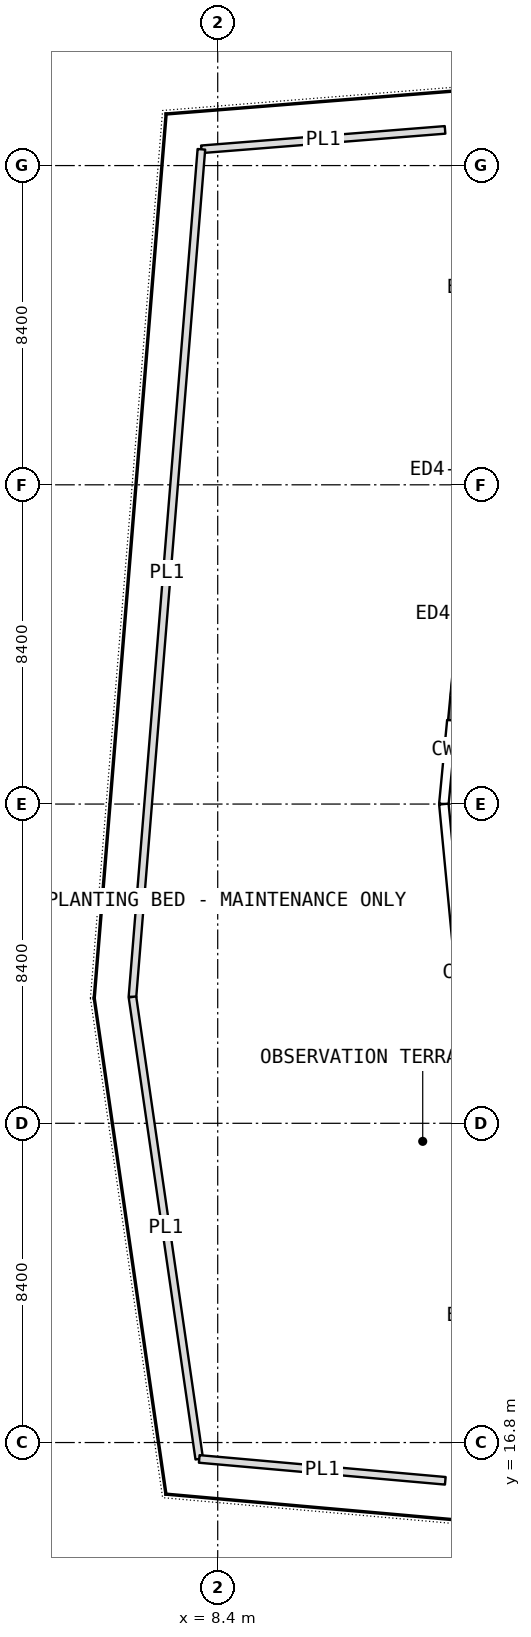
"""IFC4 building model, lengths in metres.
Left out: names, types, materials, properties, quantities, classifications, styles, units other than length and angle.
Written with IfcOpenShell. Run it as: python <this file> out.ifc"""

import sys

from ifc_helpers import new_model, si_unit, direction, frame, frame_2d, origin, place, context, subcontext, project, spatial, rectangle, extrude, element, save


model = new_model("IFC4")
c1 = context("Model", 3, precision=1e-05, world=origin(), true_north=direction((0.0, 1.0)))
c2 = subcontext(c1, "Body", "Model", "MODEL_VIEW")
j1 = project(units=[si_unit("LENGTHUNIT", "METRE"), si_unit("PLANEANGLEUNIT", "RADIAN")], contexts=[c1])
p1 = place(None, origin())
s1 = spatial("IfcSite", under=j1, at=p1, CompositionType="ELEMENT")
p2 = place(p1, origin())
s2 = spatial("IfcBuilding", under=s1, at=p2, CompositionType="ELEMENT")
p3 = place(p2, frame((0.0, 0.0, 291.35)))
s3 = spatial("IfcBuildingStorey", under=s2, at=p3, CompositionType="ELEMENT", Elevation=291.35)
p4 = place(p3, frame((14.791, 38.191, 0.0), z_axis=(0.0, 0.0, 1.0), x_axis=(-0.095313116599, -0.995447341553, 0.0)))
e1 = element("IfcWall", 1, at=p4, inside=s3, PredefinedType="SOLIDWALL", context=c2, shape_type="SweptSolid", body=[
    extrude(rectangle(XDim=2.4, YDim=0.2, at=frame_2d((1.2, 0.0))), origin(), (0.0, 0.0, 1.0), 5.1),
])
p5 = place(p4, frame((0.6, 0.0, 0.0)))
e2 = element("IfcOpeningElement", 2, at=p5, cuts=e1, PredefinedType="OPENING", context=c2, shape_type="SweptSolid", body=[
    extrude(rectangle(XDim=1.2, YDim=2.4, at=frame_2d((0.6, 1.2))), frame((0.0, 0.11, 0.0), z_axis=(0.0, -1.0, 0.0), x_axis=(1.0, 0.0, 0.0)), (0.0, 0.0, 1.0), 0.22),
])
p6 = place(p3, frame((14.382, 51.339, 0.0), z_axis=(0.0, 0.0, 1.0), x_axis=(-0.996836484012, -0.079479709002, 0.0)))
e3 = element("IfcWall", 3, at=p6, inside=s3, PredefinedType="USERDEFINED", context=c2, shape_type="SweptSolid", body=[
    extrude(rectangle(XDim=6.432, YDim=0.2, at=frame_2d((3.216, 0.0))), origin(), (0.0, 0.0, 1.0), 0.6),
])
p7 = place(p3, frame((7.97, 50.828, 0.0), z_axis=(0.0, 0.0, 1.0), x_axis=(-0.08106428772, -0.996708874876, 0.0)))
e4 = element("IfcWall", 4, at=p7, inside=s3, PredefinedType="USERDEFINED", context=c2, shape_type="SweptSolid", body=[
    extrude(rectangle(XDim=22.377, YDim=0.2, at=frame_2d((11.188, 0.0))), origin(), (0.0, 0.0, 1.0), 0.6),
])
p8 = place(p3, frame((6.156, 28.525, 0.0), z_axis=(0.0, 0.0, 1.0), x_axis=(0.143096409383, -0.989708753938, 0.0)))
e5 = element("IfcWall", 5, at=p8, inside=s3, PredefinedType="USERDEFINED", context=c2, shape_type="SweptSolid", body=[
    extrude(rectangle(XDim=12.282, YDim=0.2, at=frame_2d((6.141, 0.0))), origin(), (0.0, 0.0, 1.0), 0.6),
])
p9 = place(p3, frame((7.914, 16.369, 0.0), z_axis=(0.0, 0.0, 1.0), x_axis=(0.996073744761, -0.088527368643, 0.0)))
e6 = element("IfcWall", 6, at=p9, inside=s3, PredefinedType="USERDEFINED", context=c2, shape_type="SweptSolid", body=[
    extrude(rectangle(XDim=6.5, YDim=0.2, at=frame_2d((3.25, 0.0))), origin(), (0.0, 0.0, 1.0), 0.6),
])
save(model, sys.argv[1])
